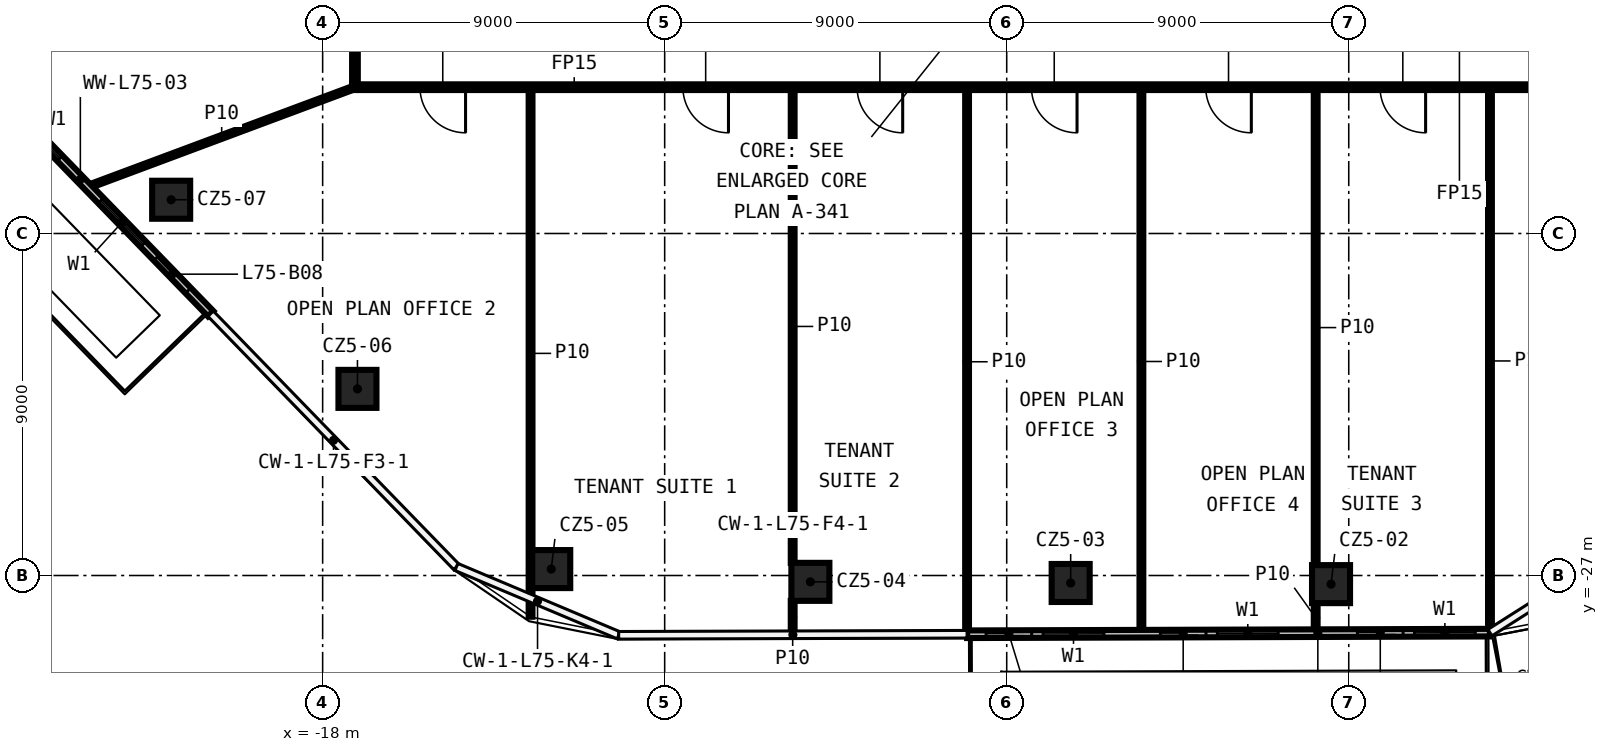
"""IFC4 building model, lengths in metres.
Left out: names, types, materials, properties, quantities, classifications, styles, units other than length and angle.
Written with IfcOpenShell. Run it as: python <this file> out.ifc"""

import sys

from ifc_helpers import new_model, si_unit, direction, frame, frame_2d, origin, origin_2d, place, context, subcontext, project, spatial, rectangle, extrude, element, fill, save


model = new_model("IFC4")
c1 = context("Model", 3, precision=1e-05, world=origin(), true_north=direction((0.0, 1.0)))
c2 = subcontext(c1, "Body", "Model", "MODEL_VIEW")
j1 = project(units=[si_unit("LENGTHUNIT", "METRE"), si_unit("PLANEANGLEUNIT", "RADIAN")], contexts=[c1])
p1 = place(None, origin())
s1 = spatial("IfcSite", under=j1, at=p1, CompositionType="ELEMENT")
p2 = place(p1, origin())
s2 = spatial("IfcBuilding", under=s1, at=p2, CompositionType="ELEMENT")
p3 = place(p2, frame((0.0, 0.0, 348.8)))
s3 = spatial("IfcBuildingStorey", under=s2, at=p3, CompositionType="ELEMENT", Elevation=348.8)
for number, where, z_axis, x_axis in (
    (1, (8.534, -27.227, 0.0), (0.0, 0.0, 1.0), (1.0, 0.0, 0.0)),
    (2, (1.683, -27.197, 0.0), (0.0, 0.0, 1.0), (1.0, 0.0, 0.0)),
    (3, (-5.166, -27.167, 0.0), (0.0, 0.0, 1.0), (1.0, 0.0, 0.0)),
    (4, (-11.985, -26.831, 0.0), (0.0, 0.0, 1.0), (1.0, 0.0, 0.0)),
    (5, (-17.084, -22.089, 0.0), (0.0, 0.0, 1.0), (1.0, 0.0, 0.0)),
    (6, (-21.986, -17.112, 0.0), (0.0, 0.0, 1.0), (1.0, 0.0, 0.0)),
):
    element("IfcColumn", number, at=place(p3, frame(where, z_axis=z_axis, x_axis=x_axis)), inside=s3, PredefinedType="COLUMN", context=c2, shape_type="SweptSolid", body=[
        extrude(rectangle(XDim=1.0, YDim=1.0, at=origin_2d()), origin(), (0.0, 0.0, 1.0), 3.7),
    ])
p4 = place(p3, frame((17.225, -14.15, 0.0), z_axis=(0.0, 0.0, 1.0), x_axis=(-1.0, 0.0, 0.0)))
e7 = element("IfcWall", 7, at=p4, inside=s3, PredefinedType="PARTITIONING", context=c2, shape_type="SweptSolid", body=[
    extrude(rectangle(XDim=34.45, YDim=0.15, at=frame_2d((17.225, 0.0))), origin(), (0.0, 0.0, 1.0), 3.7),
])
p5 = place(p4, frame((31.464, 0.0, 0.0)))
e8 = element("IfcOpeningElement", 8, at=p5, cuts=e7, PredefinedType="OPENING", context=c2, shape_type="SweptSolid", body=[
    extrude(rectangle(XDim=1.2, YDim=2.1, at=frame_2d((0.6, 1.05))), frame((0.0, 0.085, 0.0), z_axis=(0.0, -1.0, 0.0), x_axis=(1.0, 0.0, 0.0)), (0.0, 0.0, 1.0), 0.17),
])
p6 = place(p4, frame((24.546, 0.0, 0.0)))
e9 = element("IfcOpeningElement", 9, at=p6, cuts=e7, PredefinedType="OPENING", context=c2, shape_type="SweptSolid", body=[
    extrude(rectangle(XDim=1.2, YDim=2.1, at=frame_2d((0.6, 1.05))), frame((0.0, 0.085, 0.0), z_axis=(0.0, -1.0, 0.0), x_axis=(1.0, 0.0, 0.0)), (0.0, 0.0, 1.0), 0.17),
])
p7 = place(p4, frame((19.962, 0.0, 0.0)))
e10 = element("IfcOpeningElement", 10, at=p7, cuts=e7, PredefinedType="OPENING", context=c2, shape_type="SweptSolid", body=[
    extrude(rectangle(XDim=1.2, YDim=2.1, at=frame_2d((0.6, 1.05))), frame((0.0, 0.085, 0.0), z_axis=(0.0, -1.0, 0.0), x_axis=(1.0, 0.0, 0.0)), (0.0, 0.0, 1.0), 0.17),
])
p8 = place(p4, frame((15.375, 0.0, 0.0)))
e11 = element("IfcOpeningElement", 11, at=p8, cuts=e7, PredefinedType="OPENING", context=c2, shape_type="SweptSolid", body=[
    extrude(rectangle(XDim=1.2, YDim=2.1, at=frame_2d((0.6, 1.05))), frame((0.0, 0.085, 0.0), z_axis=(0.0, -1.0, 0.0), x_axis=(1.0, 0.0, 0.0)), (0.0, 0.0, 1.0), 0.17),
])
p9 = place(p4, frame((10.788, 0.0, 0.0)))
e12 = element("IfcOpeningElement", 12, at=p9, cuts=e7, PredefinedType="OPENING", context=c2, shape_type="SweptSolid", body=[
    extrude(rectangle(XDim=1.2, YDim=2.1, at=frame_2d((0.6, 1.05))), frame((0.0, 0.085, 0.0), z_axis=(0.0, -1.0, 0.0), x_axis=(1.0, 0.0, 0.0)), (0.0, 0.0, 1.0), 0.17),
])
p10 = place(p4, frame((6.202, 0.0, 0.0)))
e13 = element("IfcOpeningElement", 13, at=p10, cuts=e7, PredefinedType="OPENING", context=c2, shape_type="SweptSolid", body=[
    extrude(rectangle(XDim=1.2, YDim=2.1, at=frame_2d((0.6, 1.05))), frame((0.0, 0.085, 0.0), z_axis=(0.0, -1.0, 0.0), x_axis=(1.0, 0.0, 0.0)), (0.0, 0.0, 1.0), 0.17),
])
p11 = place(p4, frame((1.897, 0.0, 0.0)))
e14 = element("IfcOpeningElement", 14, at=p11, cuts=e7, PredefinedType="OPENING", context=c2, shape_type="SweptSolid", body=[
    extrude(rectangle(XDim=1.2, YDim=2.1, at=frame_2d((0.6, 1.05))), frame((0.0, 0.085, 0.0), z_axis=(0.0, -1.0, 0.0), x_axis=(1.0, 0.0, 0.0)), (0.0, 0.0, 1.0), 0.17),
])
p12 = place(p3, frame((-24.164, -16.767, 0.0), z_axis=(0.0, 0.0, 1.0), x_axis=(0.936910882714, 0.349568302127, 0.0)))
e15 = element("IfcWall", 15, at=p12, inside=s3, PredefinedType="PARTITIONING", context=c2, shape_type="SweptSolid", body=[
    extrude(rectangle(XDim=7.486, YDim=0.1, at=frame_2d((3.743, 0.0))), origin(), (0.0, 0.0, 1.0), 3.7),
])
p13 = place(p3, frame((12.716, -28.483, 0.0), z_axis=(0.0, 0.0, 1.0), x_axis=(0.0, 1.0, 0.0)))
e16 = element("IfcWall", 16, at=p13, inside=s3, PredefinedType="PARTITIONING", context=c2, shape_type="SweptSolid", body=[
    extrude(rectangle(XDim=14.258, YDim=0.1, at=frame_2d((7.129, 0.0))), origin(), (0.0, 0.0, 1.0), 3.7),
])
p14 = place(p3, frame((8.13, -28.498, 0.0), z_axis=(0.0, 0.0, 1.0), x_axis=(0.0, 1.0, 0.0)))
e17 = element("IfcWall", 17, at=p14, inside=s3, PredefinedType="PARTITIONING", context=c2, shape_type="SweptSolid", body=[
    extrude(rectangle(XDim=0.771, YDim=0.1, at=frame_2d((0.385, 0.0))), origin(), (0.0, 0.0, 1.0), 3.7),
])
p15 = place(p3, frame((8.13, -26.727, 0.0), z_axis=(0.0, 0.0, 1.0), x_axis=(0.0, 1.0, 0.0)))
e18 = element("IfcWall", 18, at=p15, inside=s3, PredefinedType="PARTITIONING", context=c2, shape_type="SweptSolid", body=[
    extrude(rectangle(XDim=12.502, YDim=0.1, at=frame_2d((6.251, 0.0))), origin(), (0.0, 0.0, 1.0), 3.7),
])
p16 = place(p3, frame((3.544, -28.512, 0.0), z_axis=(0.0, 0.0, 1.0), x_axis=(0.0, 1.0, 0.0)))
e19 = element("IfcWall", 19, at=p16, inside=s3, PredefinedType="PARTITIONING", context=c2, shape_type="SweptSolid", body=[
    extrude(rectangle(XDim=14.287, YDim=0.1, at=frame_2d((7.143, 0.0))), origin(), (0.0, 0.0, 1.0), 3.7),
])
p17 = place(p3, frame((-1.043, -28.526, 0.0), z_axis=(0.0, 0.0, 1.0), x_axis=(0.0, 1.0, 0.0)))
e20 = element("IfcWall", 20, at=p17, inside=s3, PredefinedType="PARTITIONING", context=c2, shape_type="SweptSolid", body=[
    extrude(rectangle(XDim=14.301, YDim=0.1, at=frame_2d((7.15, 0.0))), origin(), (0.0, 0.0, 1.0), 3.7),
])
p18 = place(p3, frame((-5.632, -28.54, 0.0), z_axis=(0.0, 0.0, 1.0), x_axis=(0.0, 1.0, 0.0)))
e21 = element("IfcWall", 21, at=p18, inside=s3, PredefinedType="PARTITIONING", context=c2, shape_type="SweptSolid", body=[
    extrude(rectangle(XDim=0.873, YDim=0.1, at=frame_2d((0.437, 0.0))), origin(), (0.0, 0.0, 1.0), 3.7),
])
p19 = place(p3, frame((-5.632, -26.667, 0.0), z_axis=(0.0, 0.0, 1.0), x_axis=(0.0, 1.0, 0.0)))
e22 = element("IfcWall", 22, at=p19, inside=s3, PredefinedType="PARTITIONING", context=c2, shape_type="SweptSolid", body=[
    extrude(rectangle(XDim=12.442, YDim=0.1, at=frame_2d((6.221, 0.0))), origin(), (0.0, 0.0, 1.0), 3.7),
])
p20 = place(p3, frame((-12.529, -28.085, 0.0), z_axis=(0.0, 0.0, 1.0), x_axis=(0.0, 1.0, 0.0)))
e23 = element("IfcWall", 23, at=p20, inside=s3, PredefinedType="PARTITIONING", context=c2, shape_type="SweptSolid", body=[
    extrude(rectangle(XDim=13.86, YDim=0.1, at=frame_2d((6.93, 0.0))), origin(), (0.0, 0.0, 1.0), 3.7),
])
p21 = place(p3, frame((-17.15, -14.075, 0.0), z_axis=(0.0, 0.0, 1.0), x_axis=(0.0, 1.0, 0.0)))
e24 = element("IfcWall", 24, at=p21, inside=s3, PredefinedType="PARTITIONING", context=c2, shape_type="SweptSolid", body=[
    extrude(rectangle(XDim=28.15, YDim=0.15, at=frame_2d((14.075, 0.0))), origin(), (0.0, 0.0, 1.0), 3.7),
])
p22 = place(p21, frame((3.891, 0.0, 0.0)))
e25 = element("IfcOpeningElement", 25, at=p22, cuts=e24, PredefinedType="OPENING", context=c2, shape_type="SweptSolid", body=[
    extrude(rectangle(XDim=1.2, YDim=2.1, at=frame_2d((0.6, 1.05))), frame((0.0, 0.085, 0.0), z_axis=(0.0, -1.0, 0.0), x_axis=(1.0, 0.0, 0.0)), (0.0, 0.0, 1.0), 0.17),
])
p23 = place(p21, frame((24.312, 0.0, 0.0)))
e26 = element("IfcOpeningElement", 26, at=p23, cuts=e24, PredefinedType="OPENING", context=c2, shape_type="SweptSolid", body=[
    extrude(rectangle(XDim=1.2, YDim=2.1, at=frame_2d((0.6, 1.05))), frame((0.0, 0.085, 0.0), z_axis=(0.0, -1.0, 0.0), x_axis=(1.0, 0.0, 0.0)), (0.0, 0.0, 1.0), 0.17),
])
p24 = place(p3, frame((-27.422, -13.438, 0.0), z_axis=(0.0, 0.0, 1.0), x_axis=(0.696377931732, -0.717675258175, 0.0)))
e27 = element("IfcWall", 27, at=p24, inside=s3, PredefinedType="SOLIDWALL", context=c2, shape_type="SweptSolid", body=[
    extrude(rectangle(XDim=9.297, YDim=0.2, at=frame_2d((4.648, 0.0))), origin(), (0.0, 0.0, 1.0), 3.7),
])
p25 = place(p24, frame((2.0, 0.0, 0.6)))
e28 = element("IfcOpeningElement", 28, at=p25, cuts=e27, PredefinedType="OPENING", context=c2, shape_type="SweptSolid", body=[
    extrude(rectangle(XDim=1.6, YDim=2.4, at=frame_2d((0.8, 1.2))), frame((0.0, 0.11, 0.0), z_axis=(0.0, -1.0, 0.0), x_axis=(1.0, 0.0, 0.0)), (0.0, 0.0, 1.0), 0.22),
])
p26 = place(p24, frame((0.5, 0.0, 0.0)))
e29 = element("IfcOpeningElement", 29, at=p26, cuts=e27, PredefinedType="OPENING", context=c2, shape_type="SweptSolid", body=[
    extrude(rectangle(XDim=1.2, YDim=2.4, at=frame_2d((0.6, 1.2))), frame((0.0, 0.11, 0.0), z_axis=(0.0, -1.0, 0.0), x_axis=(1.0, 0.0, 0.0)), (0.0, 0.0, 1.0), 0.22),
])
p27 = place(p24, frame((5.148, 0.0, 0.6)))
e30 = element("IfcOpeningElement", 30, at=p27, cuts=e27, PredefinedType="OPENING", context=c2, shape_type="SweptSolid", body=[
    extrude(rectangle(XDim=1.6, YDim=2.4, at=frame_2d((0.8, 1.2))), frame((0.0, 0.11, 0.0), z_axis=(0.0, -1.0, 0.0), x_axis=(1.0, 0.0, 0.0)), (0.0, 0.0, 1.0), 0.22),
])
p28 = place(p24, frame((7.249, 0.0, 0.0)))
e31 = element("IfcOpeningElement", 31, at=p28, cuts=e27, PredefinedType="OPENING", context=c2, shape_type="SweptSolid", body=[
    extrude(rectangle(XDim=1.2, YDim=2.4, at=frame_2d((0.6, 1.2))), frame((0.0, 0.11, 0.0), z_axis=(0.0, -1.0, 0.0), x_axis=(1.0, 0.0, 0.0)), (0.0, 0.0, 1.0), 0.22),
])
p29 = place(p3, frame((-1.042, -28.546, 0.0), z_axis=(0.0, 0.0, 1.0), x_axis=(0.999995287953, 0.003069865224, 0.0)))
e32 = element("IfcWall", 32, at=p29, inside=s3, PredefinedType="SOLIDWALL", context=c2, shape_type="SweptSolid", body=[
    extrude(rectangle(XDim=13.758, YDim=0.2, at=frame_2d((6.879, 0.0))), origin(), (0.0, 0.0, 1.0), 3.7),
])
p30 = place(p29, frame((2.0, 0.0, 0.6)))
e33 = element("IfcOpeningElement", 33, at=p30, cuts=e32, PredefinedType="OPENING", context=c2, shape_type="SweptSolid", body=[
    extrude(rectangle(XDim=1.6, YDim=2.4, at=frame_2d((0.8, 1.2))), frame((0.0, 0.11, 0.0), z_axis=(0.0, -1.0, 0.0), x_axis=(1.0, 0.0, 0.0)), (0.0, 0.0, 1.0), 0.22),
])
p31 = place(p29, frame((0.5, 0.0, 0.0)))
e34 = element("IfcOpeningElement", 34, at=p31, cuts=e32, PredefinedType="OPENING", context=c2, shape_type="SweptSolid", body=[
    extrude(rectangle(XDim=1.2, YDim=2.4, at=frame_2d((0.6, 1.2))), frame((0.0, 0.11, 0.0), z_axis=(0.0, -1.0, 0.0), x_axis=(1.0, 0.0, 0.0)), (0.0, 0.0, 1.0), 0.22),
])
p32 = place(p29, frame((6.586, 0.0, 0.6)))
e35 = element("IfcOpeningElement", 35, at=p32, cuts=e32, PredefinedType="OPENING", context=c2, shape_type="SweptSolid", body=[
    extrude(rectangle(XDim=1.6, YDim=2.4, at=frame_2d((0.8, 1.2))), frame((0.0, 0.11, 0.0), z_axis=(0.0, -1.0, 0.0), x_axis=(1.0, 0.0, 0.0)), (0.0, 0.0, 1.0), 0.22),
])
p33 = place(p29, frame((5.086, 0.0, 0.0)))
e36 = element("IfcOpeningElement", 36, at=p33, cuts=e32, PredefinedType="OPENING", context=c2, shape_type="SweptSolid", body=[
    extrude(rectangle(XDim=1.2, YDim=2.4, at=frame_2d((0.6, 1.2))), frame((0.0, 0.11, 0.0), z_axis=(0.0, -1.0, 0.0), x_axis=(1.0, 0.0, 0.0)), (0.0, 0.0, 1.0), 0.22),
])
p34 = place(p29, frame((11.772, 0.0, 0.6)))
e37 = element("IfcOpeningElement", 37, at=p34, cuts=e32, PredefinedType="OPENING", context=c2, shape_type="SweptSolid", body=[
    extrude(rectangle(XDim=1.6, YDim=2.4, at=frame_2d((0.8, 1.2))), frame((0.0, 0.11, 0.0), z_axis=(0.0, -1.0, 0.0), x_axis=(1.0, 0.0, 0.0)), (0.0, 0.0, 1.0), 0.22),
])
p35 = place(p29, frame((10.272, 0.0, 0.0)))
e38 = element("IfcOpeningElement", 38, at=p35, cuts=e32, PredefinedType="OPENING", context=c2, shape_type="SweptSolid", body=[
    extrude(rectangle(XDim=1.2, YDim=2.4, at=frame_2d((0.6, 1.2))), frame((0.0, 0.11, 0.0), z_axis=(0.0, -1.0, 0.0), x_axis=(1.0, 0.0, 0.0)), (0.0, 0.0, 1.0), 0.22),
])
p36 = place(p5, origin())
e39 = element("IfcDoor", 39, at=p36, inside=s3, OperationType="SINGLE_SWING_LEFT", PredefinedType="DOOR", context=c2, shape_type="SweptSolid", body=[
    extrude(rectangle(XDim=1.2, YDim=2.1, at=frame_2d((0.6, 1.05))), frame((0.0, 0.025, 0.0), z_axis=(0.0, -1.0, 0.0), x_axis=(1.0, 0.0, 0.0)), (0.0, 0.0, 1.0), 0.05),
])
fill(e8, e39)
p37 = place(p6, origin())
e40 = element("IfcDoor", 40, at=p37, inside=s3, OperationType="SINGLE_SWING_RIGHT", PredefinedType="DOOR", context=c2, shape_type="SweptSolid", body=[
    extrude(rectangle(XDim=1.2, YDim=2.1, at=frame_2d((0.6, 1.05))), frame((0.0, 0.025, 0.0), z_axis=(0.0, -1.0, 0.0), x_axis=(1.0, 0.0, 0.0)), (0.0, 0.0, 1.0), 0.05),
])
fill(e9, e40)
p38 = place(p7, origin())
e41 = element("IfcDoor", 41, at=p38, inside=s3, OperationType="SINGLE_SWING_LEFT", PredefinedType="DOOR", context=c2, shape_type="SweptSolid", body=[
    extrude(rectangle(XDim=1.2, YDim=2.1, at=frame_2d((0.6, 1.05))), frame((0.0, 0.025, 0.0), z_axis=(0.0, -1.0, 0.0), x_axis=(1.0, 0.0, 0.0)), (0.0, 0.0, 1.0), 0.05),
])
fill(e10, e41)
p39 = place(p8, origin())
e42 = element("IfcDoor", 42, at=p39, inside=s3, OperationType="SINGLE_SWING_RIGHT", PredefinedType="DOOR", context=c2, shape_type="SweptSolid", body=[
    extrude(rectangle(XDim=1.2, YDim=2.1, at=frame_2d((0.6, 1.05))), frame((0.0, 0.025, 0.0), z_axis=(0.0, -1.0, 0.0), x_axis=(1.0, 0.0, 0.0)), (0.0, 0.0, 1.0), 0.05),
])
fill(e11, e42)
p40 = place(p9, origin())
e43 = element("IfcDoor", 43, at=p40, inside=s3, OperationType="SINGLE_SWING_LEFT", PredefinedType="DOOR", context=c2, shape_type="SweptSolid", body=[
    extrude(rectangle(XDim=1.2, YDim=2.1, at=frame_2d((0.6, 1.05))), frame((0.0, 0.025, 0.0), z_axis=(0.0, -1.0, 0.0), x_axis=(1.0, 0.0, 0.0)), (0.0, 0.0, 1.0), 0.05),
])
fill(e12, e43)
p41 = place(p10, origin())
e44 = element("IfcDoor", 44, at=p41, inside=s3, OperationType="SINGLE_SWING_RIGHT", PredefinedType="DOOR", context=c2, shape_type="SweptSolid", body=[
    extrude(rectangle(XDim=1.2, YDim=2.1, at=frame_2d((0.6, 1.05))), frame((0.0, 0.025, 0.0), z_axis=(0.0, -1.0, 0.0), x_axis=(1.0, 0.0, 0.0)), (0.0, 0.0, 1.0), 0.05),
])
fill(e13, e44)
p42 = place(p25, origin())
e45 = element("IfcWindow", 45, at=p42, inside=s3, PartitioningType="SINGLE_PANEL", PredefinedType="WINDOW", context=c2, shape_type="SweptSolid", body=[
    extrude(rectangle(XDim=1.6, YDim=2.4, at=frame_2d((0.8, 1.2))), frame((0.0, 0.03, 0.0), z_axis=(0.0, -1.0, 0.0), x_axis=(1.0, 0.0, 0.0)), (0.0, 0.0, 1.0), 0.06),
])
fill(e28, e45)
p43 = place(p27, origin())
e46 = element("IfcWindow", 46, at=p43, inside=s3, PartitioningType="SINGLE_PANEL", PredefinedType="WINDOW", context=c2, shape_type="SweptSolid", body=[
    extrude(rectangle(XDim=1.6, YDim=2.4, at=frame_2d((0.8, 1.2))), frame((0.0, 0.03, 0.0), z_axis=(0.0, -1.0, 0.0), x_axis=(1.0, 0.0, 0.0)), (0.0, 0.0, 1.0), 0.06),
])
fill(e30, e46)
p44 = place(p28, origin())
e47 = element("IfcDoor", 47, at=p44, inside=s3, OperationType="SLIDING_TO_LEFT", PredefinedType="DOOR", context=c2, shape_type="SweptSolid", body=[
    extrude(rectangle(XDim=1.2, YDim=2.4, at=frame_2d((0.6, 1.2))), frame((0.0, 0.025, 0.0), z_axis=(0.0, -1.0, 0.0), x_axis=(1.0, 0.0, 0.0)), (0.0, 0.0, 1.0), 0.05),
])
fill(e31, e47)
p45 = place(p30, origin())
e48 = element("IfcWindow", 48, at=p45, inside=s3, PartitioningType="SINGLE_PANEL", PredefinedType="WINDOW", context=c2, shape_type="SweptSolid", body=[
    extrude(rectangle(XDim=1.6, YDim=2.4, at=frame_2d((0.8, 1.2))), frame((0.0, 0.03, 0.0), z_axis=(0.0, -1.0, 0.0), x_axis=(1.0, 0.0, 0.0)), (0.0, 0.0, 1.0), 0.06),
])
fill(e33, e48)
p46 = place(p31, origin())
e49 = element("IfcDoor", 49, at=p46, inside=s3, OperationType="SLIDING_TO_LEFT", PredefinedType="DOOR", context=c2, shape_type="SweptSolid", body=[
    extrude(rectangle(XDim=1.2, YDim=2.4, at=frame_2d((0.6, 1.2))), frame((0.0, 0.025, 0.0), z_axis=(0.0, -1.0, 0.0), x_axis=(1.0, 0.0, 0.0)), (0.0, 0.0, 1.0), 0.05),
])
fill(e34, e49)
p47 = place(p32, origin())
e50 = element("IfcWindow", 50, at=p47, inside=s3, PartitioningType="SINGLE_PANEL", PredefinedType="WINDOW", context=c2, shape_type="SweptSolid", body=[
    extrude(rectangle(XDim=1.6, YDim=2.4, at=frame_2d((0.8, 1.2))), frame((0.0, 0.03, 0.0), z_axis=(0.0, -1.0, 0.0), x_axis=(1.0, 0.0, 0.0)), (0.0, 0.0, 1.0), 0.06),
])
fill(e35, e50)
p48 = place(p33, origin())
e51 = element("IfcDoor", 51, at=p48, inside=s3, OperationType="SLIDING_TO_LEFT", PredefinedType="DOOR", context=c2, shape_type="SweptSolid", body=[
    extrude(rectangle(XDim=1.2, YDim=2.4, at=frame_2d((0.6, 1.2))), frame((0.0, 0.025, 0.0), z_axis=(0.0, -1.0, 0.0), x_axis=(1.0, 0.0, 0.0)), (0.0, 0.0, 1.0), 0.05),
])
fill(e36, e51)
p49 = place(p34, origin())
e52 = element("IfcWindow", 52, at=p49, inside=s3, PartitioningType="SINGLE_PANEL", PredefinedType="WINDOW", context=c2, shape_type="SweptSolid", body=[
    extrude(rectangle(XDim=1.6, YDim=2.4, at=frame_2d((0.8, 1.2))), frame((0.0, 0.03, 0.0), z_axis=(0.0, -1.0, 0.0), x_axis=(1.0, 0.0, 0.0)), (0.0, 0.0, 1.0), 0.06),
])
fill(e37, e52)
p50 = place(p35, origin())
e53 = element("IfcDoor", 53, at=p50, inside=s3, OperationType="SLIDING_TO_LEFT", PredefinedType="DOOR", context=c2, shape_type="SweptSolid", body=[
    extrude(rectangle(XDim=1.2, YDim=2.4, at=frame_2d((0.6, 1.2))), frame((0.0, 0.025, 0.0), z_axis=(0.0, -1.0, 0.0), x_axis=(1.0, 0.0, 0.0)), (0.0, 0.0, 1.0), 0.05),
])
fill(e38, e53)
save(model, sys.argv[1])
